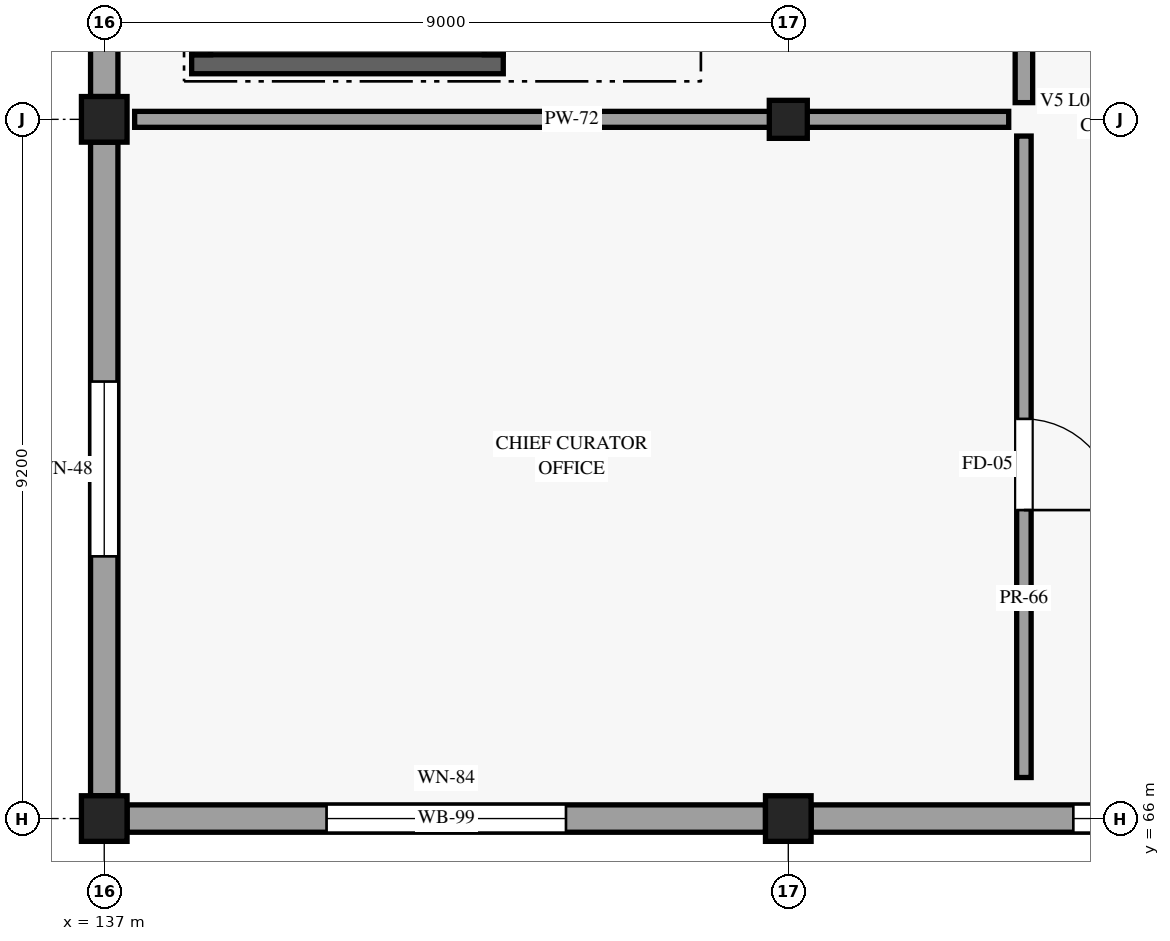
"""IFC4 building model, lengths in metres.
Left out: names, types, materials, properties, quantities, classifications, styles, units other than length and angle.
Written with IfcOpenShell. Run it as: python <this file> out.ifc"""

import sys

from ifc_helpers import new_model, si_unit, direction, frame, frame_2d, origin, origin_2d, place, context, subcontext, project, spatial, rectangle, extrude, element, fill, save


model = new_model("IFC4")
c1 = context("Model", 3, precision=1e-05, world=origin(), true_north=direction((0.0, 1.0)))
c2 = subcontext(c1, "Body", "Model", "MODEL_VIEW")
j1 = project(units=[si_unit("LENGTHUNIT", "METRE"), si_unit("PLANEANGLEUNIT", "RADIAN")], contexts=[c1])
p1 = place(None, origin())
s1 = spatial("IfcSite", under=j1, at=p1, CompositionType="ELEMENT")
p2 = place(p1, origin())
s2 = spatial("IfcBuilding", under=s1, at=p2, CompositionType="ELEMENT")
p3 = place(p2, frame((0.0, 0.0, 15.0)))
s3 = spatial("IfcBuildingStorey", under=s2, at=p3, CompositionType="ELEMENT", Elevation=15.0)
for number, where, z_axis, x_axis in (
    (1, (137.0, 66.0, 0.0), (0.0, 0.0, 1.0), (1.0, 0.0, 0.0)),
    (2, (137.0, 75.2, 0.0), (0.0, 0.0, 1.0), (1.0, 0.0, 0.0)),
    (3, (146.0, 66.0, 0.0), (0.0, 0.0, 1.0), (1.0, 0.0, 0.0)),
):
    element("IfcColumn", number, at=place(p3, frame(where, z_axis=z_axis, x_axis=x_axis)), inside=s3, PredefinedType="COLUMN", context=c2, shape_type="SweptSolid", body=[
        extrude(rectangle(XDim=0.6, YDim=0.6, at=origin_2d()), origin(), (0.0, 0.0, 1.0), 4.5),
    ])
p4 = place(p3, frame((146.0, 75.2, 0.0), z_axis=(0.0, 0.0, 1.0), x_axis=(1.0, 0.0, 0.0)))
e4 = element("IfcColumn", 4, at=p4, inside=s3, PredefinedType="COLUMN", context=c2, shape_type="SweptSolid", body=[
    extrude(rectangle(XDim=0.5, YDim=0.5, at=origin_2d()), origin(), (0.0, 0.0, 1.0), 4.5),
])
p5 = place(p3, frame((137.3, 66.0, 0.0), z_axis=(0.0, 0.0, 1.0), x_axis=(1.0, 0.0, 0.0)))
e5 = element("IfcWall", 5, at=p5, inside=s3, PredefinedType="STANDARD", context=c2, shape_type="SweptSolid", body=[
    extrude(rectangle(XDim=8.4, YDim=0.36, at=frame_2d((4.2, 0.0))), origin(), (0.0, 0.0, 1.0), 3.725),
])
p6 = place(p5, frame((5.775, 0.0, 0.85), z_axis=(0.0, 0.0, 1.0), x_axis=(-1.0, 0.0, 0.0)))
e6 = element("IfcOpeningElement", 6, at=p6, cuts=e5, PredefinedType="OPENING", context=c2, shape_type="SweptSolid", body=[
    extrude(rectangle(XDim=3.15, YDim=2.55, at=frame_2d((1.575, 1.275))), frame((0.0, 0.19, 0.0), z_axis=(0.0, -1.0, 0.0), x_axis=(1.0, 0.0, 0.0)), (0.0, 0.0, 1.0), 0.38),
])
p7 = place(p3, frame((146.3, 66.0, 0.0), z_axis=(0.0, 0.0, 1.0), x_axis=(1.0, 0.0, 0.0)))
e7 = element("IfcWall", 7, at=p7, inside=s3, PredefinedType="STANDARD", context=c2, shape_type="SweptSolid", body=[
    extrude(rectangle(XDim=8.4, YDim=0.36, at=frame_2d((4.2, 0.0))), origin(), (0.0, 0.0, 1.0), 3.725),
])
p8 = place(p7, frame((4.95, 0.0, 0.85), z_axis=(0.0, 0.0, 1.0), x_axis=(-1.0, 0.0, 0.0)))
e8 = element("IfcOpeningElement", 8, at=p8, cuts=e7, PredefinedType="OPENING", context=c2, shape_type="SweptSolid", body=[
    extrude(rectangle(XDim=1.5, YDim=2.2, at=frame_2d((0.75, 1.1))), frame((0.0, 0.19, 0.0), z_axis=(0.0, -1.0, 0.0), x_axis=(1.0, 0.0, 0.0)), (0.0, 0.0, 1.0), 0.38),
])
p9 = place(p3, frame((137.0, 66.3, 0.0), z_axis=(0.0, 0.0, 1.0), x_axis=(0.0, 1.0, 0.0)))
e9 = element("IfcWall", 9, at=p9, inside=s3, PredefinedType="STANDARD", context=c2, shape_type="SweptSolid", body=[
    extrude(rectangle(XDim=8.6, YDim=0.36, at=frame_2d((4.3, 0.0))), origin(), (0.0, 0.0, 1.0), 3.725),
])
p10 = place(p9, frame((3.15, 0.0, 0.85)))
e10 = element("IfcOpeningElement", 10, at=p10, cuts=e9, PredefinedType="OPENING", context=c2, shape_type="SweptSolid", body=[
    extrude(rectangle(XDim=2.3, YDim=2.5, at=frame_2d((1.15, 1.25))), frame((0.0, 0.19, 0.0), z_axis=(0.0, -1.0, 0.0), x_axis=(1.0, 0.0, 0.0)), (0.0, 0.0, 1.0), 0.38),
])
p11 = place(p3, frame((137.0, 75.5, 0.0), z_axis=(0.0, 0.0, 1.0), x_axis=(0.0, 1.0, 0.0)))
e11 = element("IfcWall", 11, at=p11, inside=s3, PredefinedType="STANDARD", context=c2, shape_type="SweptSolid", body=[
    extrude(rectangle(XDim=8.6, YDim=0.36, at=frame_2d((4.3, 0.0))), origin(), (0.0, 0.0, 1.0), 3.725),
])
p12 = place(p11, frame((2.95, 0.0, 0.85)))
e12 = element("IfcOpeningElement", 12, at=p12, cuts=e11, PredefinedType="OPENING", context=c2, shape_type="SweptSolid", body=[
    extrude(rectangle(XDim=2.7, YDim=2.2, at=frame_2d((1.35, 1.1))), frame((0.0, 0.19, 0.0), z_axis=(0.0, -1.0, 0.0), x_axis=(1.0, 0.0, 0.0)), (0.0, 0.0, 1.0), 0.38),
])
p13 = place(p3, frame((138.15, 75.925, 0.0), z_axis=(0.0, 0.0, 1.0), x_axis=(1.0, 0.0, 0.0)))
e13 = element("IfcWall", 13, at=p13, inside=s3, PredefinedType="SHEAR", context=c2, shape_type="SweptSolid", body=[
    extrude(rectangle(XDim=4.1, YDim=0.25, at=frame_2d((2.05, 0.0))), origin(), (0.0, 0.0, 1.0), 4.18),
])
for number, where, z_axis, x_axis in (
    (14, (138.275, 76.05, 0.0), (0.0, 0.0, 1.0), (0.0, 1.0, 0.0)),
    (15, (142.125, 76.05, 0.0), (0.0, 0.0, 1.0), (0.0, 1.0, 0.0)),
):
    element("IfcWall", number, at=place(p3, frame(where, z_axis=z_axis, x_axis=x_axis)), inside=s3, PredefinedType="SHEAR", context=c2, shape_type="SweptSolid", body=[
        extrude(rectangle(XDim=8.65, YDim=0.25, at=frame_2d((4.325, 0.0))), origin(), (0.0, 0.0, 1.0), 4.18),
    ])
p14 = place(p3, frame((149.1, 66.54, 0.0), z_axis=(0.0, 0.0, 1.0), x_axis=(0.0, 1.0, 0.0)))
e16 = element("IfcWall", 16, at=p14, inside=s3, PredefinedType="PARTITIONING", context=c2, shape_type="SweptSolid", body=[
    extrude(rectangle(XDim=8.44, YDim=0.19, at=frame_2d((4.22, 0.0))), origin(), (0.0, 0.0, 1.0), 3.725),
])
p15 = place(p14, frame((4.719, 0.0, 0.0), z_axis=(0.0, 0.0, 1.0), x_axis=(-1.0, 0.0, 0.0)))
e17 = element("IfcOpeningElement", 17, at=p15, cuts=e16, PredefinedType="OPENING", context=c2, shape_type="SweptSolid", body=[
    extrude(rectangle(XDim=1.2, YDim=2.3, at=frame_2d((0.6, 1.15))), frame((0.0, 0.105, 0.0), z_axis=(0.0, -1.0, 0.0), x_axis=(1.0, 0.0, 0.0)), (0.0, 0.0, 1.0), 0.21),
])
p16 = place(p3, frame((137.4, 75.2, 0.0), z_axis=(0.0, 0.0, 1.0), x_axis=(1.0, 0.0, 0.0)))
e18 = element("IfcWall", 18, at=p16, inside=s3, PredefinedType="PARTITIONING", context=c2, shape_type="SweptSolid", body=[
    extrude(rectangle(XDim=11.5, YDim=0.21, at=frame_2d((5.75, 0.0))), origin(), (0.0, 0.0, 1.0), 3.725),
])
p17 = place(p3, frame((149.1, 75.42, 0.0), z_axis=(0.0, 0.0, 1.0), x_axis=(0.0, 1.0, 0.0)))
e19 = element("IfcWall", 19, at=p17, inside=s3, PredefinedType="PARTITIONING", context=c2, shape_type="SweptSolid", body=[
    extrude(rectangle(XDim=8.76, YDim=0.23, at=frame_2d((4.38, 0.0))), origin(), (0.0, 0.0, 1.0), 3.725),
])
p18 = place(p17, frame((4.8, 0.0, 0.0), z_axis=(0.0, 0.0, 1.0), x_axis=(-1.0, 0.0, 0.0)))
e20 = element("IfcOpeningElement", 20, at=p18, cuts=e19, PredefinedType="OPENING", context=c2, shape_type="SweptSolid", body=[
    extrude(rectangle(XDim=0.92, YDim=2.12, at=frame_2d((0.46, 1.06))), frame((0.0, 0.125, 0.0), z_axis=(0.0, -1.0, 0.0), x_axis=(1.0, 0.0, 0.0)), (0.0, 0.0, 1.0), 0.25),
])
p19 = place(p6, origin())
e21 = element("IfcWindow", 21, at=p19, inside=s3, PartitioningType="SINGLE_PANEL", PredefinedType="WINDOW", context=c2, shape_type="SweptSolid", body=[
    extrude(rectangle(XDim=3.15, YDim=2.55, at=frame_2d((1.575, 1.275))), frame((0.0, 0.03, 0.0), z_axis=(0.0, -1.0, 0.0), x_axis=(1.0, 0.0, 0.0)), (0.0, 0.0, 1.0), 0.06),
])
fill(e6, e21)
p20 = place(p8, origin())
e22 = element("IfcWindow", 22, at=p20, inside=s3, PartitioningType="SINGLE_PANEL", PredefinedType="WINDOW", context=c2, shape_type="SweptSolid", body=[
    extrude(rectangle(XDim=1.5, YDim=2.2, at=frame_2d((0.75, 1.1))), frame((0.0, 0.03, 0.0), z_axis=(0.0, -1.0, 0.0), x_axis=(1.0, 0.0, 0.0)), (0.0, 0.0, 1.0), 0.06),
])
fill(e8, e22)
p21 = place(p10, origin())
e23 = element("IfcWindow", 23, at=p21, inside=s3, PartitioningType="SINGLE_PANEL", PredefinedType="WINDOW", context=c2, shape_type="SweptSolid", body=[
    extrude(rectangle(XDim=2.3, YDim=2.5, at=frame_2d((1.15, 1.25))), frame((0.0, 0.03, 0.0), z_axis=(0.0, -1.0, 0.0), x_axis=(1.0, 0.0, 0.0)), (0.0, 0.0, 1.0), 0.06),
])
fill(e10, e23)
p22 = place(p15, origin())
e24 = element("IfcDoor", 24, at=p22, inside=s3, OperationType="SINGLE_SWING_RIGHT", PredefinedType="DOOR", context=c2, shape_type="SweptSolid", body=[
    extrude(rectangle(XDim=1.2, YDim=2.3, at=frame_2d((0.6, 1.15))), frame((0.0, 0.025, 0.0), z_axis=(0.0, -1.0, 0.0), x_axis=(1.0, 0.0, 0.0)), (0.0, 0.0, 1.0), 0.05),
])
fill(e17, e24)
save(model, sys.argv[1])
